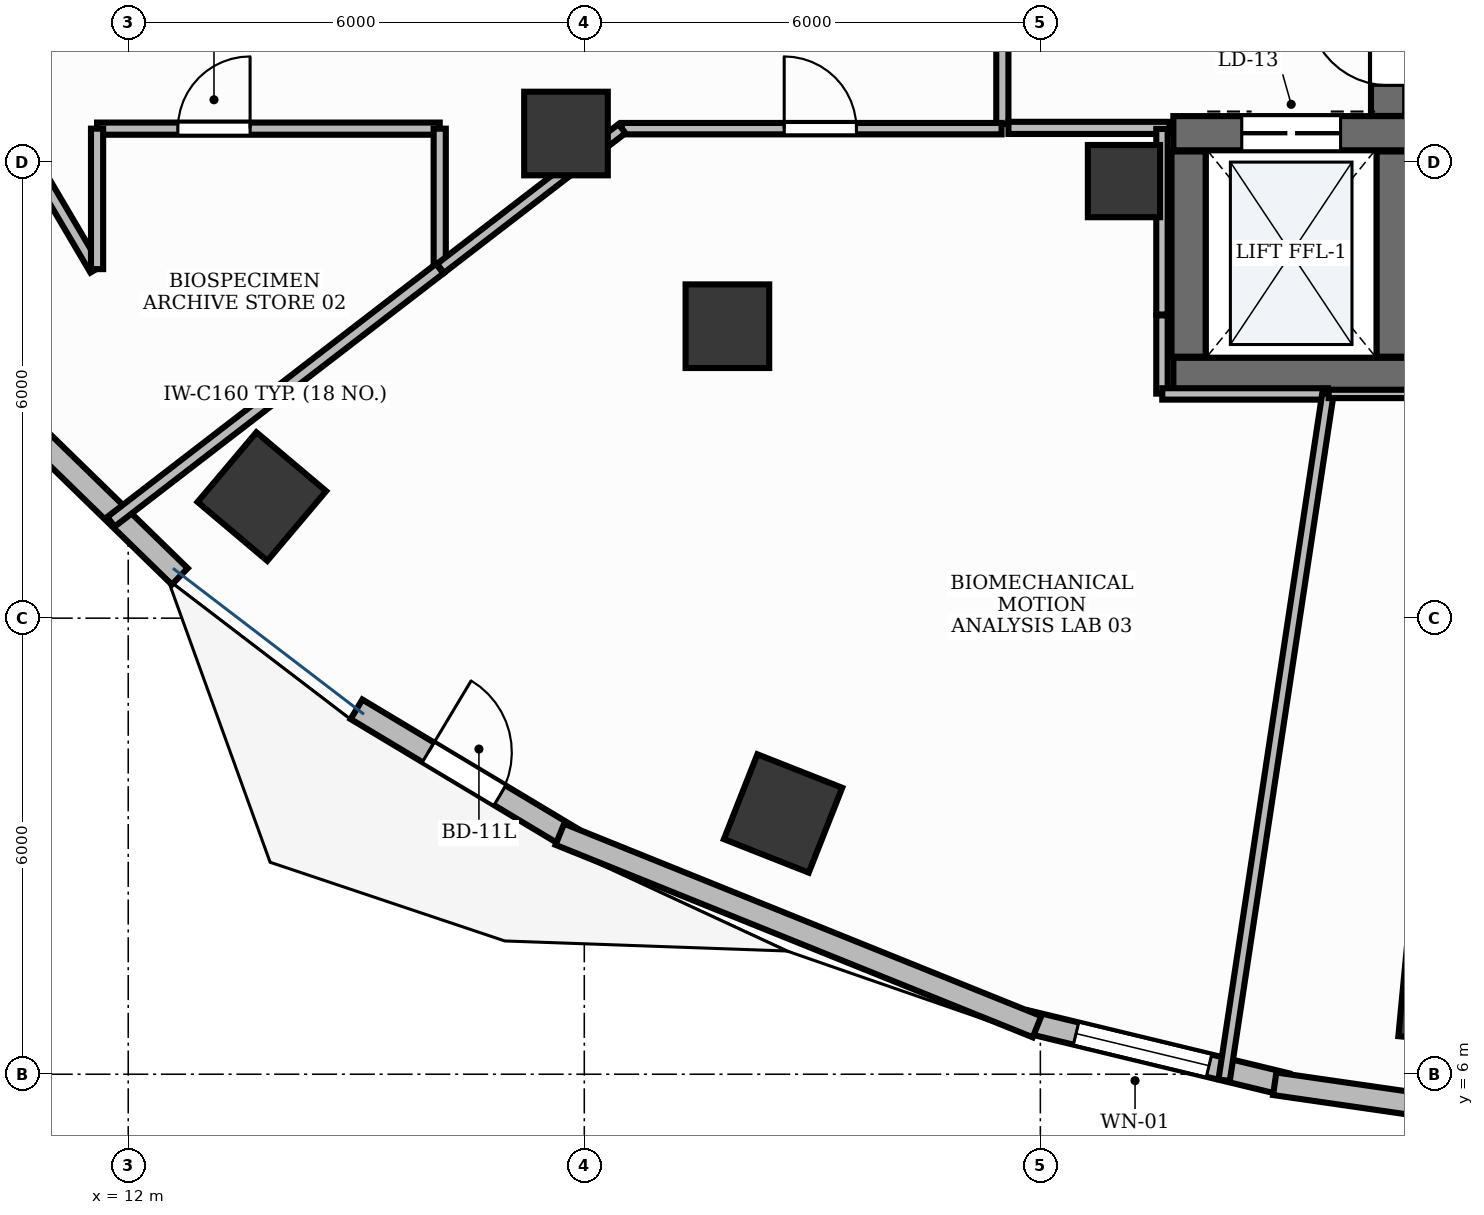
"""IFC4 building model, lengths in metres.
Left out: names, types, materials, properties, quantities, classifications, styles, units other than length and angle.
Written with IfcOpenShell. Run it as: python <this file> out.ifc"""

import sys

from ifc_helpers import new_model, si_unit, direction, frame, frame_2d, origin, origin_2d, place, context, subcontext, project, spatial, rectangle, extrude, element, fill, save


model = new_model("IFC4")
c1 = context("Model", 3, precision=1e-05, world=origin(), true_north=direction((0.0, 1.0)))
c2 = subcontext(c1, "Body", "Model", "MODEL_VIEW")
j1 = project(units=[si_unit("LENGTHUNIT", "METRE"), si_unit("PLANEANGLEUNIT", "RADIAN")], contexts=[c1])
p1 = place(None, origin())
s1 = spatial("IfcSite", under=j1, at=p1, CompositionType="ELEMENT")
p2 = place(p1, origin())
s2 = spatial("IfcBuilding", under=s1, at=p2, CompositionType="ELEMENT")
p3 = place(p2, frame((0.0, 0.0, 119.4)))
s3 = spatial("IfcBuildingStorey", under=s2, at=p3, CompositionType="ELEMENT", Elevation=119.4)
p4 = place(p3, frame((28.575, 18.607, 0.0), z_axis=(0.0, 0.0, 1.0), x_axis=(0.0, 1.0, 0.0)))
e1 = element("IfcWall", 1, at=p4, inside=s3, PredefinedType="SHEAR", context=c2, shape_type="SweptSolid", body=[
    extrude(rectangle(XDim=3.283, YDim=0.45, at=frame_2d((1.642, 0.0))), origin(), (0.0, 0.0, 1.0), 3.9),
])
p5 = place(p4, frame((0.403, 0.0, 0.0)))
e2 = element("IfcOpeningElement", 2, at=p5, cuts=e1, PredefinedType="OPENING", context=c2, shape_type="SweptSolid", body=[
    extrude(rectangle(XDim=1.05, YDim=2.15, at=frame_2d((0.525, 1.075))), frame((0.0, 0.24, 0.0), z_axis=(0.0, -1.0, 0.0), x_axis=(1.0, 0.0, 0.0)), (0.0, 0.0, 1.0), 0.48),
])
p6 = place(p3, frame((25.75, 15.2, 0.0), z_axis=(0.0, 0.0, 1.0), x_axis=(1.0, 0.0, 0.0)))
e3 = element("IfcWall", 3, at=p6, inside=s3, PredefinedType="SHEAR", context=c2, shape_type="SweptSolid", body=[
    extrude(rectangle(XDim=3.1, YDim=0.45, at=frame_2d((1.55, 0.0))), origin(), (0.0, 0.0, 1.0), 3.9),
])
p7 = place(p3, frame((25.75, 18.38, 0.0), z_axis=(0.0, 0.0, 1.0), x_axis=(1.0, 0.0, 0.0)))
e4 = element("IfcWall", 4, at=p7, inside=s3, PredefinedType="SHEAR", context=c2, shape_type="SweptSolid", body=[
    extrude(rectangle(XDim=3.1, YDim=0.45, at=frame_2d((1.55, 0.0))), origin(), (0.0, 0.0, 1.0), 3.9),
])
p8 = place(p7, frame((0.9, 0.0, 0.0)))
e5 = element("IfcOpeningElement", 5, at=p8, cuts=e4, PredefinedType="OPENING", context=c2, shape_type="SweptSolid", body=[
    extrude(rectangle(XDim=1.3, YDim=2.2, at=frame_2d((0.65, 1.1))), frame((0.0, 0.24, 0.0), z_axis=(0.0, -1.0, 0.0), x_axis=(1.0, 0.0, 0.0)), (0.0, 0.0, 1.0), 0.48),
])
for number, where, z_axis, x_axis in (
    (6, (25.95, 15.44, 0.0), (0.0, 0.0, 1.0), (0.0, 1.0, 0.0)),
    (7, (28.65, 15.44, 0.0), (0.0, 0.0, 1.0), (0.0, 1.0, 0.0)),
):
    element("IfcWall", number, at=place(p3, frame(where, z_axis=z_axis, x_axis=x_axis)), inside=s3, PredefinedType="SHEAR", context=c2, shape_type="SweptSolid", body=[
        extrude(rectangle(XDim=2.7, YDim=0.45, at=frame_2d((1.35, 0.0))), origin(), (0.0, 0.0, 1.0), 3.9),
    ])
p9 = place(p3, frame((25.1, 17.75, -0.0), z_axis=(0.0, 0.0, 1.0), x_axis=(1.0, 0.0, 0.0)))
e8 = element("IfcColumn", 8, at=p9, inside=s3, PredefinedType="PILASTER", context=c2, shape_type="SweptSolid", body=[
    extrude(rectangle(XDim=0.95, YDim=0.95, at=origin_2d()), origin(), (0.0, 0.0, 1.0), 3.901),
])
p10 = place(p3, frame((17.759, 18.376, -0.0), z_axis=(0.0, 0.0, 1.0), x_axis=(1.0, 0.0, 0.0)))
e9 = element("IfcColumn", 9, at=p10, inside=s3, PredefinedType="COLUMN", context=c2, shape_type="SweptSolid", body=[
    extrude(rectangle(XDim=1.1, YDim=1.1, at=origin_2d()), origin(), (0.0, 0.0, 1.0), 3.901),
])
p11 = place(p3, frame((13.758, 13.6, -0.0), z_axis=(0.0, 0.0, 1.0), x_axis=(-0.764246456939, 0.644924300253, 0.0)))
e10 = element("IfcColumn", 10, at=p11, inside=s3, PredefinedType="COLUMN", context=c2, shape_type="SweptSolid", body=[
    extrude(rectangle(XDim=1.2, YDim=1.2, at=origin_2d()), origin(), (0.0, 0.0, 1.0), 3.901),
])
p12 = place(p3, frame((19.883, 15.841, -0.0), z_axis=(0.0, 0.0, 1.0), x_axis=(1.0, 0.0, 0.0)))
e11 = element("IfcColumn", 11, at=p12, inside=s3, PredefinedType="COLUMN", context=c2, shape_type="SweptSolid", body=[
    extrude(rectangle(XDim=1.1, YDim=1.1, at=origin_2d()), origin(), (0.0, 0.0, 1.0), 3.901),
])
for number, where, z_axis, x_axis in (
    (12, (20.615, 9.431, -0.0), (0.0, 0.0, 1.0), (-0.93, 0.367, 0.0)),
    (13, (29.364, 7.041, -0.0), (0.0, 0.0, 1.0), (-0.995, 0.095, 0.0)),
):
    element("IfcColumn", number, at=place(p3, frame(where, z_axis=z_axis, x_axis=x_axis)), inside=s3, PredefinedType="COLUMN", context=c2, shape_type="SweptSolid", body=[
        extrude(rectangle(XDim=1.2, YDim=1.2, at=origin_2d()), origin(), (0.0, 0.0, 1.0), 3.901),
    ])
p13 = place(p3, frame((15.003, 10.801, 0.0), z_axis=(0.0, 0.0, 1.0), x_axis=(0.85758429223, -0.514343447242, 0.0)))
e14 = element("IfcWall", 14, at=p13, inside=s3, PredefinedType="STANDARD", context=c2, shape_type="SweptSolid", body=[
    extrude(rectangle(XDim=3.3, YDim=0.3, at=frame_2d((1.65, 0.0))), origin(), (0.0, 0.0, 1.0), 3.9),
])
p14 = place(p13, frame((1.1, 0.0, 0.0)))
e15 = element("IfcOpeningElement", 15, at=p14, cuts=e14, PredefinedType="OPENING", context=c2, shape_type="SweptSolid", body=[
    extrude(rectangle(XDim=1.1, YDim=2.15, at=frame_2d((0.55, 1.075))), frame((0.0, 0.165, 0.0), z_axis=(0.0, -1.0, 0.0), x_axis=(1.0, 0.0, 0.0)), (0.0, 0.0, 1.0), 0.33),
])
p15 = place(p3, frame((23.809, 6.695, 0.0), z_axis=(0.0, 0.0, 1.0), x_axis=(0.972049000874, -0.234778065203, 0.0)))
e16 = element("IfcWall", 16, at=p15, inside=s3, PredefinedType="STANDARD", context=c2, shape_type="SweptSolid", body=[
    extrude(rectangle(XDim=3.528, YDim=0.3, at=frame_2d((1.764, 0.0))), origin(), (0.0, 0.0, 1.0), 3.9),
])
p16 = place(p15, frame((0.68, 0.0, 0.9)))
e17 = element("IfcOpeningElement", 17, at=p16, cuts=e16, PredefinedType="OPENING", context=c2, shape_type="SweptSolid", body=[
    extrude(rectangle(XDim=1.8, YDim=2.1, at=frame_2d((0.9, 1.05))), frame((0.0, 0.165, 0.0), z_axis=(0.0, -1.0, 0.0), x_axis=(1.0, 0.0, 0.0)), (0.0, 0.0, 1.0), 0.33),
])
p17 = place(p3, frame((10.428, 14.742, 0.0), z_axis=(0.0, 0.0, 1.0), x_axis=(0.716101112291, -0.69799655943, 0.0)))
e18 = element("IfcWall", 18, at=p17, inside=s3, PredefinedType="STANDARD", context=c2, shape_type="SweptSolid", body=[
    extrude(rectangle(XDim=3.142, YDim=0.3, at=frame_2d((1.571, 0.0))), origin(), (0.0, 0.0, 1.0), 3.9),
])
p18 = place(p3, frame((17.678, 9.157, 0.0), z_axis=(0.0, 0.0, 1.0), x_axis=(0.927423312416, -0.374013368194, 0.0)))
e19 = element("IfcWall", 19, at=p18, inside=s3, PredefinedType="STANDARD", context=c2, shape_type="SweptSolid", body=[
    extrude(rectangle(XDim=6.769, YDim=0.3, at=frame_2d((3.385, 0.0))), origin(), (0.0, 0.0, 1.0), 3.47),
])
p19 = place(p3, frame((27.083, 5.875, 0.0), z_axis=(0.0, 0.0, 1.0), x_axis=(0.989734732902, -0.142916613754, 0.0)))
e20 = element("IfcWall", 20, at=p19, inside=s3, PredefinedType="STANDARD", context=c2, shape_type="SweptSolid", body=[
    extrude(rectangle(XDim=3.611, YDim=0.3, at=frame_2d((1.806, 0.0))), origin(), (0.0, 0.0, 1.0), 3.47),
])
p20 = place(p3, frame((23.5, 18.5, 0.0), z_axis=(0.0, 0.0, 1.0), x_axis=(0.0, 1.0, 0.0)))
e21 = element("IfcWall", 21, at=p20, inside=s3, PredefinedType="PARTITIONING", context=c2, shape_type="SweptSolid", body=[
    extrude(rectangle(XDim=3.4, YDim=0.16, at=frame_2d((1.7, 0.0))), origin(), (0.0, 0.0, 1.0), 2.91),
])
p21 = place(p20, frame((1.175, 0.0, 0.0)))
e22 = element("IfcOpeningElement", 22, at=p21, cuts=e21, PredefinedType="OPENING", context=c2, shape_type="SweptSolid", body=[
    extrude(rectangle(XDim=1.05, YDim=2.15, at=frame_2d((0.525, 1.075))), frame((0.0, 0.095, 0.0), z_axis=(0.0, -1.0, 0.0), x_axis=(1.0, 0.0, 0.0)), (0.0, 0.0, 1.0), 0.19),
])
p22 = place(p3, frame((23.58, 18.45, 0.0), z_axis=(0.0, 0.0, 1.0), x_axis=(1.0, 0.0, 0.0)))
e23 = element("IfcWall", 23, at=p22, inside=s3, PredefinedType="PARTITIONING", context=c2, shape_type="SweptSolid", body=[
    extrude(rectangle(XDim=2.12, YDim=0.16, at=frame_2d((1.06, 0.0))), origin(), (0.0, 0.0, 1.0), 2.91),
])
p23 = place(p3, frame((11.59, 18.44, 0.0), z_axis=(0.0, 0.0, 1.0), x_axis=(1.0, 0.0, 0.0)))
e24 = element("IfcWall", 24, at=p23, inside=s3, PredefinedType="PARTITIONING", context=c2, shape_type="SweptSolid", body=[
    extrude(rectangle(XDim=4.508, YDim=0.16, at=frame_2d((2.254, 0.0))), origin(), (0.0, 0.0, 1.0), 2.91),
])
p24 = place(p23, frame((1.063, 0.0, 0.0)))
e25 = element("IfcOpeningElement", 25, at=p24, cuts=e24, PredefinedType="OPENING", context=c2, shape_type="SweptSolid", body=[
    extrude(rectangle(XDim=0.95, YDim=2.15, at=frame_2d((0.475, 1.075))), frame((0.0, 0.095, 0.0), z_axis=(0.0, -1.0, 0.0), x_axis=(1.0, 0.0, 0.0)), (0.0, 0.0, 1.0), 0.19),
])
p25 = place(p3, frame((18.496, 18.44, 0.0), z_axis=(0.0, 0.0, 1.0), x_axis=(1.0, 0.0, 0.0)))
e26 = element("IfcWall", 26, at=p25, inside=s3, PredefinedType="PARTITIONING", context=c2, shape_type="SweptSolid", body=[
    extrude(rectangle(XDim=4.994, YDim=0.15, at=frame_2d((2.497, 0.0))), origin(), (0.0, 0.0, 1.0), 2.91),
])
p26 = place(p25, frame((2.135, 0.0, 0.0)))
e27 = element("IfcOpeningElement", 27, at=p26, cuts=e26, PredefinedType="OPENING", context=c2, shape_type="SweptSolid", body=[
    extrude(rectangle(XDim=0.95, YDim=2.15, at=frame_2d((0.475, 1.075))), frame((0.0, 0.09, 0.0), z_axis=(0.0, -1.0, 0.0), x_axis=(1.0, 0.0, 0.0)), (0.0, 0.0, 1.0), 0.18),
])
p27 = place(p3, frame((9.359, 20.336, 0.0), z_axis=(0.0, 0.0, 1.0), x_axis=(0.508164254342, -0.86126017591, 0.0)))
e28 = element("IfcWall", 28, at=p27, inside=s3, PredefinedType="PARTITIONING", context=c2, shape_type="SweptSolid", body=[
    extrude(rectangle(XDim=4.353, YDim=0.16, at=frame_2d((2.177, 0.0))), origin(), (0.0, 0.0, 1.0), 2.91),
])
p28 = place(p3, frame((11.59, 16.592, 0.0), z_axis=(0.0, 0.0, 1.0), x_axis=(0.0, 1.0, 0.0)))
e29 = element("IfcWall", 29, at=p28, inside=s3, PredefinedType="PARTITIONING", context=c2, shape_type="SweptSolid", body=[
    extrude(rectangle(XDim=1.848, YDim=0.16, at=frame_2d((0.924, 0.0))), origin(), (0.0, 0.0, 1.0), 2.91),
])
p29 = place(p3, frame((16.098, 18.44, 0.0), z_axis=(0.0, 0.0, 1.0), x_axis=(0.0, -1.0, 0.0)))
e30 = element("IfcWall", 30, at=p29, inside=s3, PredefinedType="PARTITIONING", context=c2, shape_type="SweptSolid", body=[
    extrude(rectangle(XDim=1.841, YDim=0.16, at=frame_2d((0.92, 0.0))), origin(), (0.0, 0.0, 1.0), 2.91),
])
p30 = place(p3, frame((16.098, 16.599, 0.0), z_axis=(0.0, 0.0, 1.0), x_axis=(-0.792293030169, -0.610140766008, 0.0)))
e31 = element("IfcWall", 31, at=p30, inside=s3, PredefinedType="PARTITIONING", context=c2, shape_type="SweptSolid", body=[
    extrude(rectangle(XDim=5.459, YDim=0.16, at=frame_2d((2.729, 0.0))), origin(), (0.0, 0.0, 1.0), 2.91),
])
p31 = place(p3, frame((25.6, 18.436, 0.0), z_axis=(0.0, 0.0, 1.0), x_axis=(0.0, -1.0, 0.0)))
e32 = element("IfcWall", 32, at=p31, inside=s3, PredefinedType="PARTITIONING", context=c2, shape_type="SweptSolid", body=[
    extrude(rectangle(XDim=2.441, YDim=0.15, at=frame_2d((1.22, 0.0))), origin(), (0.0, 0.0, 1.0), 2.91),
])
p32 = place(p3, frame((25.6, 15.983, 0.0), z_axis=(0.0, 0.0, 1.0), x_axis=(0.0, -1.0, 0.0)))
e33 = element("IfcWall", 33, at=p32, inside=s3, PredefinedType="PARTITIONING", context=c2, shape_type="SweptSolid", body=[
    extrude(rectangle(XDim=1.029, YDim=0.15, at=frame_2d((0.514, 0.0))), origin(), (0.0, 0.0, 1.0), 2.91),
])
p33 = place(p3, frame((25.604, 14.95, 0.0), z_axis=(0.0, 0.0, 1.0), x_axis=(1.0, 0.0, 0.0)))
e34 = element("IfcWall", 34, at=p33, inside=s3, PredefinedType="PARTITIONING", context=c2, shape_type="SweptSolid", body=[
    extrude(rectangle(XDim=2.179, YDim=0.15, at=frame_2d((1.09, 0.0))), origin(), (0.0, 0.0, 1.0), 2.91),
])
p34 = place(p3, frame((27.783, 14.95, 0.0), z_axis=(0.0, 0.0, 1.0), x_axis=(-0.14953925345, -0.988755789706, 0.0)))
e35 = element("IfcWall", 35, at=p34, inside=s3, PredefinedType="PARTITIONING", context=c2, shape_type="SweptSolid", body=[
    extrude(rectangle(XDim=9.131, YDim=0.15, at=frame_2d((4.566, 0.0))), origin(), (0.0, 0.0, 1.0), 2.91),
])
p35 = place(p3, frame((16.108, 16.601, 0.0), z_axis=(0.0, 0.0, 1.0), x_axis=(0.792313685483, 0.61011394329, 0.0)))
e36 = element("IfcWall", 36, at=p35, inside=s3, PredefinedType="PARTITIONING", context=c2, shape_type="SweptSolid", body=[
    extrude(rectangle(XDim=3.014, YDim=0.15, at=frame_2d((1.507, 0.0))), origin(), (0.0, 0.0, 1.0), 2.91),
])
p36 = place(p3, frame((27.793, 14.95, 0.0), z_axis=(0.0, 0.0, 1.0), x_axis=(1.0, 0.0, 0.0)))
e37 = element("IfcWall", 37, at=p36, inside=s3, PredefinedType="MOVABLE", context=c2, shape_type="SweptSolid", body=[
    extrude(rectangle(XDim=1.203, YDim=0.11, at=frame_2d((0.601, 0.0))), origin(), (0.0, 0.0, 1.0), 2.91),
])
p37 = place(p14, origin())
e38 = element("IfcDoor", 38, at=p37, inside=s3, OperationType="SINGLE_SWING_LEFT", PredefinedType="DOOR", context=c2, shape_type="SweptSolid", body=[
    extrude(rectangle(XDim=1.1, YDim=2.15, at=frame_2d((0.55, 1.075))), frame((0.0, 0.025, 0.0), z_axis=(0.0, -1.0, 0.0), x_axis=(1.0, 0.0, 0.0)), (0.0, 0.0, 1.0), 0.05),
])
fill(e15, e38)
p38 = place(p16, origin())
e39 = element("IfcWindow", 39, at=p38, inside=s3, PartitioningType="SINGLE_PANEL", PredefinedType="WINDOW", context=c2, shape_type="SweptSolid", body=[
    extrude(rectangle(XDim=1.8, YDim=2.1, at=frame_2d((0.9, 1.05))), frame((0.0, 0.03, 0.0), z_axis=(0.0, -1.0, 0.0), x_axis=(1.0, 0.0, 0.0)), (0.0, 0.0, 1.0), 0.06),
])
fill(e17, e39)
p39 = place(p5, origin())
e40 = element("IfcDoor", 40, at=p39, inside=s3, OperationType="SINGLE_SWING_RIGHT", PredefinedType="DOOR", context=c2, shape_type="SweptSolid", body=[
    extrude(rectangle(XDim=1.05, YDim=2.15, at=frame_2d((0.525, 1.075))), frame((0.0, 0.025, 0.0), z_axis=(0.0, -1.0, 0.0), x_axis=(1.0, 0.0, 0.0)), (0.0, 0.0, 1.0), 0.05),
])
fill(e2, e40)
p40 = place(p8, origin())
e41 = element("IfcDoor", 41, at=p40, inside=s3, OperationType="DOUBLE_DOOR_SLIDING", PredefinedType="DOOR", context=c2, shape_type="SweptSolid", body=[
    extrude(rectangle(XDim=1.3, YDim=2.2, at=frame_2d((0.65, 1.1))), frame((0.0, 0.025, 0.0), z_axis=(0.0, -1.0, 0.0), x_axis=(1.0, 0.0, 0.0)), (0.0, 0.0, 1.0), 0.05),
])
fill(e5, e41)
p41 = place(p24, origin())
e42 = element("IfcDoor", 42, at=p41, inside=s3, OperationType="SINGLE_SWING_RIGHT", PredefinedType="DOOR", context=c2, shape_type="SweptSolid", body=[
    extrude(rectangle(XDim=0.95, YDim=2.15, at=frame_2d((0.475, 1.075))), frame((0.0, 0.025, 0.0), z_axis=(0.0, -1.0, 0.0), x_axis=(1.0, 0.0, 0.0)), (0.0, 0.0, 1.0), 0.05),
])
fill(e25, e42)
p42 = place(p26, origin())
e43 = element("IfcDoor", 43, at=p42, inside=s3, OperationType="SINGLE_SWING_LEFT", PredefinedType="DOOR", context=c2, shape_type="SweptSolid", body=[
    extrude(rectangle(XDim=0.95, YDim=2.15, at=frame_2d((0.475, 1.075))), frame((0.0, 0.025, 0.0), z_axis=(0.0, -1.0, 0.0), x_axis=(1.0, 0.0, 0.0)), (0.0, 0.0, 1.0), 0.05),
])
fill(e27, e43)
save(model, sys.argv[1])
